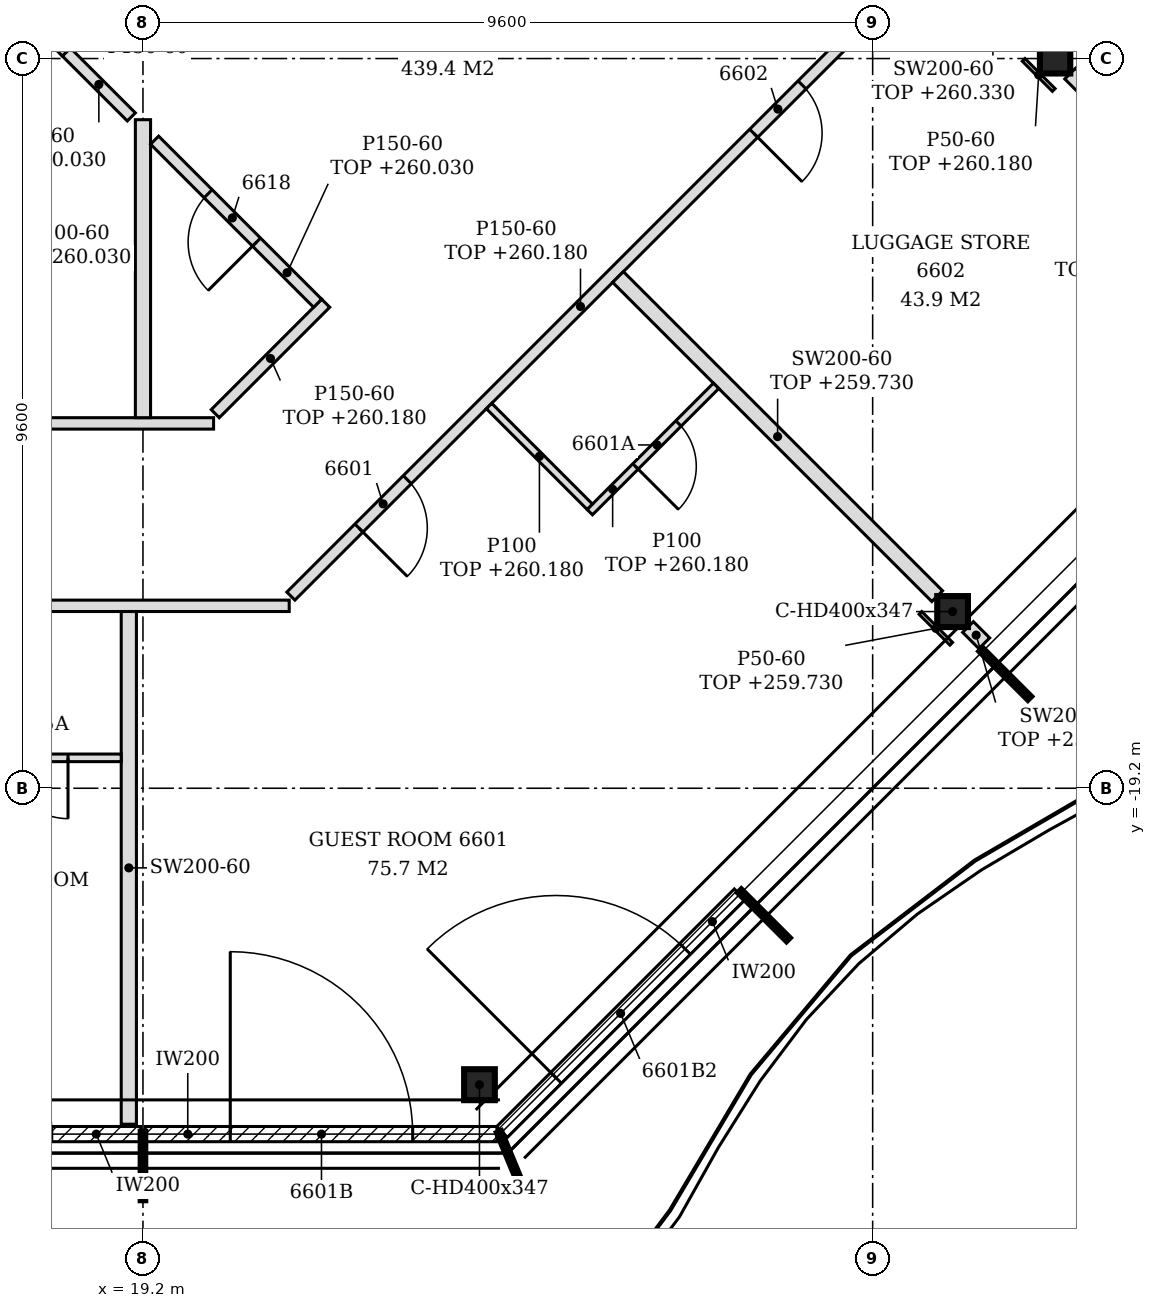
"""IFC4 building model, lengths in metres.
Left out: names, types, materials, properties, quantities, classifications, styles, units other than length and angle.
Written with IfcOpenShell. Run it as: python <this file> out.ifc"""

import sys

from ifc_helpers import new_model, si_unit, direction, frame, frame_2d, origin, origin_2d, place, context, subcontext, project, spatial, polyline, rectangle, i_section, outline, extrude, clip, halfspace, element, fill, save


model = new_model("IFC4")
c1 = context("Model", 3, precision=1e-05, world=origin(), true_north=direction((0.0, 1.0)))
c2 = subcontext(c1, "Body", "Model", "MODEL_VIEW")
j1 = project(units=[si_unit("LENGTHUNIT", "METRE"), si_unit("PLANEANGLEUNIT", "RADIAN")], contexts=[c1])
p1 = place(None, origin())
s1 = spatial("IfcSite", under=j1, at=p1, CompositionType="ELEMENT")
p2 = place(p1, origin())
s2 = spatial("IfcBuilding", under=s1, at=p2, CompositionType="ELEMENT")
p3 = place(p2, frame((0.0, 0.0, 257.4)))
s3 = spatial("IfcBuildingStorey", under=s2, at=p3, CompositionType="ELEMENT", Elevation=257.4)
for number, where, z_axis, x_axis in (
    (1, (23.627, -23.1, -0.15), (0.0, 0.0, 1.0), (1.0, 0.0, 0.0)),
    (2, (29.852, -16.876, -0.15), (0.0, 0.0, 1.0), (1.0, 0.0, 0.0)),
):
    element("IfcColumn", number, at=place(p3, frame(where, z_axis=z_axis, x_axis=x_axis)), inside=s3, PredefinedType="COLUMN", context=c2, shape_type="Clipping", body=[
        clip(extrude(i_section(OverallWidth=0.404, OverallDepth=0.407, WebThickness=0.027, FlangeThickness=0.044, FilletRadius=0.015, at=origin_2d()), origin(), (0.0, 0.0, 1.0), 3.5), halfspace(frame((0.0, 0.0, 3.05), z_axis=(0.0, 0.0, 1.0), x_axis=(1.0, 0.0, 0.0)), False)),
    ])
p4 = place(p3, frame((31.2, -9.6, -0.15), z_axis=(0.0, 0.0, 1.0), x_axis=(1.0, 0.0, 0.0)))
e3 = element("IfcColumn", 3, at=p4, inside=s3, PredefinedType="COLUMN", context=c2, shape_type="SweptSolid", body=[
    extrude(i_section(OverallWidth=0.399, OverallDepth=0.393, WebThickness=0.023, FlangeThickness=0.037, FilletRadius=0.015, at=origin_2d()), origin(), (0.0, 0.0, 1.0), 3.5),
])
p5 = place(p3, frame((14.43, -23.75, 0.0), z_axis=(0.0, 0.0, 1.0), x_axis=(1.0, 0.0, 0.0)))
e4 = element("IfcWall", 4, at=p5, inside=s3, PredefinedType="NOTDEFINED", context=c2, shape_type="SweptSolid", body=[
    extrude(rectangle(XDim=4.74, YDim=0.2, at=frame_2d((2.37, 0.0))), origin(), (0.0, 0.0, 1.0), 3.35),
])
p6 = place(p5, frame((1.17, 0.0, 0.0)))
e5 = element("IfcOpeningElement", 5, at=p6, cuts=e4, PredefinedType="OPENING", context=c2, shape_type="SweptSolid", body=[
    extrude(rectangle(XDim=2.4, YDim=2.4, at=frame_2d((1.2, 1.2))), frame((0.0, 0.11, 0.0), z_axis=(0.0, -1.0, 0.0), x_axis=(1.0, 0.0, 0.0)), (0.0, 0.0, 1.0), 0.22),
])
p7 = place(p3, frame((19.23, -23.75, 0.0), z_axis=(0.0, 0.0, 1.0), x_axis=(1.0, 0.0, 0.0)))
e6 = element("IfcWall", 6, at=p7, inside=s3, PredefinedType="NOTDEFINED", context=c2, shape_type="SweptSolid", body=[
    extrude(rectangle(XDim=4.626, YDim=0.2, at=frame_2d((2.313, 0.0))), origin(), (0.0, 0.0, 1.0), 3.35),
])
p8 = place(p7, frame((1.119, 0.0, 0.0)))
e7 = element("IfcOpeningElement", 7, at=p8, cuts=e6, PredefinedType="OPENING", context=c2, shape_type="SweptSolid", body=[
    extrude(rectangle(XDim=2.4, YDim=2.4, at=frame_2d((1.2, 1.2))), frame((0.0, 0.11, 0.0), z_axis=(0.0, -1.0, 0.0), x_axis=(1.0, 0.0, 0.0)), (0.0, 0.0, 1.0), 0.22),
])
p9 = place(p3, frame((23.925, -23.722, 0.0), z_axis=(0.0, 0.0, 1.0), x_axis=(0.707106781187, 0.707106781187, 0.0)))
e8 = element("IfcWall", 8, at=p9, inside=s3, PredefinedType="NOTDEFINED", context=c2, shape_type="SweptSolid", body=[
    extrude(rectangle(XDim=4.421, YDim=0.2, at=frame_2d((2.21, 0.0))), origin(), (0.0, 0.0, 1.0), 3.35),
])
p10 = place(p9, frame((1.005, 0.0, 0.0)))
e9 = element("IfcOpeningElement", 9, at=p10, cuts=e8, PredefinedType="OPENING", context=c2, shape_type="SweptSolid", body=[
    extrude(rectangle(XDim=2.4, YDim=2.4, at=frame_2d((1.2, 1.2))), frame((0.0, 0.11, 0.0), z_axis=(0.0, -1.0, 0.0), x_axis=(1.0, 0.0, 0.0)), (0.0, 0.0, 1.0), 0.22),
])
p11 = place(p3, frame((19.014, -23.62, 0.0), z_axis=(0.0, 0.0, 1.0), x_axis=(0.0, 1.0, 0.0)))
e10 = element("IfcWall", 10, at=p11, inside=s3, PredefinedType="PARTITIONING", context=c2, shape_type="SweptSolid", body=[
    extrude(outline(polyline([(0.0, 0.0), (6.745, 0.0), (6.745, 2.63), (1.02, 2.63), (1.018, 2.33), (0.02, 2.33), (0.018, 3.35), (0.0, 3.35), (0.0, 0.0)])), frame((0.0, 0.1, 0.0), z_axis=(0.0, -1.0, 0.0), x_axis=(1.0, 0.0, 0.0)), (0.0, 0.0, 1.0), 0.2),
])
p12 = place(p3, frame((16.564, -18.8, 0.0), z_axis=(0.0, 0.0, 1.0), x_axis=(1.0, 0.0, 0.0)))
e11 = element("IfcWall", 11, at=p12, inside=s3, PredefinedType="PARTITIONING", context=c2, shape_type="SweptSolid", body=[
    extrude(rectangle(XDim=2.35, YDim=0.1, at=frame_2d((1.175, 0.0))), origin(), (0.0, 0.0, 1.0), 3.35),
])
p13 = place(p12, frame((0.85, 0.0, 0.0)))
e12 = element("IfcOpeningElement", 12, at=p13, cuts=e11, PredefinedType="OPENING", context=c2, shape_type="SweptSolid", body=[
    extrude(rectangle(XDim=0.8, YDim=2.1, at=frame_2d((0.4, 1.05))), frame((0.0, 0.06, 0.0), z_axis=(0.0, -1.0, 0.0), x_axis=(1.0, 0.0, 0.0)), (0.0, 0.0, 1.0), 0.12),
])
p14 = place(p3, frame((30.269, -17.293, 0.0), z_axis=(0.0, 0.0, 1.0), x_axis=(-0.707509117806, 0.706704215511, 0.0)))
e13 = element("IfcWall", 13, at=p14, inside=s3, PredefinedType="PARTITIONING", context=c2, shape_type="SweptSolid", body=[
    extrude(rectangle(XDim=0.303, YDim=0.2, at=frame_2d((0.152, 0.0))), origin(), (0.0, 0.0, 1.0), 2.33),
])
p15 = place(p3, frame((-0.85, -16.8, 0.0), z_axis=(0.0, 0.0, 1.0), x_axis=(1.0, 0.0, 0.0)))
e14 = element("IfcWall", 14, at=p15, inside=s3, PredefinedType="PARTITIONING", context=c2, shape_type="SweptSolid", body=[
    extrude(outline(polyline([(0.0, 0.0), (21.974, 0.0), (21.974, 3.35), (20.199, 3.35), (20.198, 2.63), (19.899, 2.63), (19.897, 3.35), (8.199, 3.35), (8.198, 2.63), (7.899, 2.63), (7.897, 3.35), (0.712, 3.35), (0.71, 2.674), (0.504, 2.674), (0.502, 2.33), (0.0, 2.33), (0.0, 0.0)])), frame((0.0, 0.075, 0.0), z_axis=(0.0, -1.0, 0.0), x_axis=(1.0, 0.0, 0.0)), (0.0, 0.0, 1.0), 0.15),
])
p16 = place(p15, frame((2.893, 0.0, 0.0)))
e15 = element("IfcOpeningElement", 15, at=p16, cuts=e14, PredefinedType="OPENING", context=c2, shape_type="SweptSolid", body=[
    extrude(rectangle(XDim=0.9, YDim=2.1, at=frame_2d((0.45, 1.05))), frame((0.0, 0.085, 0.0), z_axis=(0.0, -1.0, 0.0), x_axis=(1.0, 0.0, 0.0)), (0.0, 0.0, 1.0), 0.17),
])
p17 = place(p15, frame((12.492, 0.0, 0.0)))
e16 = element("IfcOpeningElement", 16, at=p17, cuts=e14, PredefinedType="OPENING", context=c2, shape_type="SweptSolid", body=[
    extrude(rectangle(XDim=0.9, YDim=2.1, at=frame_2d((0.45, 1.05))), frame((0.0, 0.085, 0.0), z_axis=(0.0, -1.0, 0.0), x_axis=(1.0, 0.0, 0.0)), (0.0, 0.0, 1.0), 0.17),
])
p18 = place(p3, frame((21.146, -16.672, 0.0), z_axis=(0.0, 0.0, 1.0), x_axis=(0.707106781187, 0.707106781187, 0.0)))
e17 = element("IfcWall", 17, at=p18, inside=s3, PredefinedType="PARTITIONING", context=c2, shape_type="SweptSolid", body=[
    extrude(rectangle(XDim=17.719, YDim=0.15, at=frame_2d((8.859, 0.0))), origin(), (0.0, 0.0, 1.0), 2.78),
])
p19 = place(p18, frame((1.266, 0.0, 0.0)))
e18 = element("IfcOpeningElement", 18, at=p19, cuts=e17, PredefinedType="OPENING", context=c2, shape_type="SweptSolid", body=[
    extrude(rectangle(XDim=0.9, YDim=2.1, at=frame_2d((0.45, 1.05))), frame((0.0, 0.085, 0.0), z_axis=(0.0, -1.0, 0.0), x_axis=(1.0, 0.0, 0.0)), (0.0, 0.0, 1.0), 0.17),
])
p20 = place(p18, frame((8.611, 0.0, 0.0)))
e19 = element("IfcOpeningElement", 19, at=p20, cuts=e17, PredefinedType="OPENING", context=c2, shape_type="SweptSolid", body=[
    extrude(rectangle(XDim=0.9, YDim=2.1, at=frame_2d((0.45, 1.05))), frame((0.0, 0.085, 0.0), z_axis=(0.0, -1.0, 0.0), x_axis=(1.0, 0.0, 0.0)), (0.0, 0.0, 1.0), 0.17),
])
p21 = place(p18, frame((13.012, 0.0, 0.0)))
e20 = element("IfcOpeningElement", 20, at=p21, cuts=e17, PredefinedType="OPENING", context=c2, shape_type="SweptSolid", body=[
    extrude(rectangle(XDim=0.9, YDim=2.1, at=frame_2d((0.45, 1.05))), frame((0.0, 0.085, 0.0), z_axis=(0.0, -1.0, 0.0), x_axis=(1.0, 0.0, 0.0)), (0.0, 0.0, 1.0), 0.17),
])
p22 = place(p3, frame((29.649, -16.673, 0.0), z_axis=(0.0, 0.0, 1.0), x_axis=(-0.70712733811, 0.707086223665, 0.0)))
e21 = element("IfcWall", 21, at=p22, inside=s3, PredefinedType="PARTITIONING", context=c2, shape_type="SweptSolid", body=[
    extrude(rectangle(XDim=5.938, YDim=0.2, at=frame_2d((2.969, 0.0))), origin(), (0.0, 0.0, 1.0), 2.33),
])
p23 = place(p3, frame((25.079, -15.567, 0.0), z_axis=(0.0, 0.0, 1.0), x_axis=(0.707106781187, 0.707106781187, 0.0)))
e22 = element("IfcWall", 22, at=p23, inside=s3, PredefinedType="PARTITIONING", context=c2, shape_type="SweptSolid", body=[
    extrude(rectangle(XDim=2.35, YDim=0.1, at=frame_2d((1.175, 0.0))), origin(), (0.0, 0.0, 1.0), 2.78),
])
p24 = place(p23, frame((0.85, 0.0, 0.0)))
e23 = element("IfcOpeningElement", 23, at=p24, cuts=e22, PredefinedType="OPENING", context=c2, shape_type="SweptSolid", body=[
    extrude(rectangle(XDim=0.8, YDim=2.1, at=frame_2d((0.4, 1.05))), frame((0.0, 0.06, 0.0), z_axis=(0.0, -1.0, 0.0), x_axis=(1.0, 0.0, 0.0)), (0.0, 0.0, 1.0), 0.12),
])
p25 = place(p3, frame((25.079, -15.497, 0.0), z_axis=(0.0, 0.0, 1.0), x_axis=(-0.707106781187, 0.707106781187, 0.0)))
e24 = element("IfcWall", 24, at=p25, inside=s3, PredefinedType="PARTITIONING", context=c2, shape_type="SweptSolid", body=[
    extrude(rectangle(XDim=1.875, YDim=0.1, at=frame_2d((0.938, 0.0))), origin(), (0.0, 0.0, 1.0), 2.78),
])
p26 = place(p3, frame((7.125, -14.4, 0.0), z_axis=(0.0, 0.0, 1.0), x_axis=(1.0, 0.0, 0.0)))
e25 = element("IfcWall", 25, at=p26, inside=s3, PredefinedType="PARTITIONING", context=c2, shape_type="SweptSolid", body=[
    extrude(outline(polyline([(0.0, 0.0), (13.004, 0.0), (13.004, 2.78), (12.225, 2.78), (12.223, 2.63), (11.925, 2.63), (11.923, 2.78), (0.225, 2.78), (0.223, 2.63), (0.0, 2.63), (0.0, 0.0)])), frame((0.0, 0.075, 0.0), z_axis=(0.0, -1.0, 0.0), x_axis=(1.0, 0.0, 0.0)), (0.0, 0.0, 1.0), 0.15),
])
p27 = place(p3, frame((19.2, -14.325, 0.0), z_axis=(0.0, 0.0, 1.0), x_axis=(0.0, 1.0, 0.0)))
e26 = element("IfcWall", 26, at=p27, inside=s3, PredefinedType="PARTITIONING", context=c2, shape_type="SweptSolid", body=[
    extrude(rectangle(XDim=3.92, YDim=0.2, at=frame_2d((1.96, 0.0))), origin(), (0.0, 0.0, 1.0), 2.63),
])
p28 = place(p3, frame((20.151, -14.272, 0.0), z_axis=(0.0, 0.0, 1.0), x_axis=(0.707106781187, 0.707106781187, 0.0)))
e27 = element("IfcWall", 27, at=p28, inside=s3, PredefinedType="PARTITIONING", context=c2, shape_type="SweptSolid", body=[
    extrude(rectangle(XDim=2.055, YDim=0.15, at=frame_2d((1.027, 0.0))), origin(), (0.0, 0.0, 1.0), 2.78),
])
p29 = place(p3, frame((34.581, -12.981, 0.0), z_axis=(0.0, 0.0, 1.0), x_axis=(-0.707133900936, 0.707079660397, 0.0)))
e28 = element("IfcWall", 28, at=p29, inside=s3, PredefinedType="PARTITIONING", context=c2, shape_type="SweptSolid", body=[
    extrude(rectangle(XDim=4.501, YDim=0.2, at=frame_2d((2.25, 0.0))), origin(), (0.0, 0.0, 1.0), 2.33),
])
p30 = place(p3, frame((21.498, -12.819, 0.0), z_axis=(0.0, 0.0, 1.0), x_axis=(-0.707106781187, 0.707106781187, 0.0)))
e29 = element("IfcWall", 29, at=p30, inside=s3, PredefinedType="PARTITIONING", context=c2, shape_type="SweptSolid", body=[
    extrude(rectangle(XDim=3.033, YDim=0.15, at=frame_2d((1.517, 0.0))), origin(), (0.0, 0.0, 1.0), 2.63),
])
p31 = place(p30, frame((1.137, 0.0, 0.0)))
e30 = element("IfcOpeningElement", 30, at=p31, cuts=e29, PredefinedType="OPENING", context=c2, shape_type="SweptSolid", body=[
    extrude(rectangle(XDim=0.9, YDim=2.1, at=frame_2d((0.45, 1.05))), frame((0.0, 0.085, 0.0), z_axis=(0.0, -1.0, 0.0), x_axis=(1.0, 0.0, 0.0)), (0.0, 0.0, 1.0), 0.17),
])
p32 = place(p3, frame((19.047, -10.368, 0.0), z_axis=(0.0, 0.0, 1.0), x_axis=(-0.707409718716, 0.706803713817, 0.0)))
e31 = element("IfcWall", 31, at=p32, inside=s3, PredefinedType="PARTITIONING", context=c2, shape_type="SweptSolid", body=[
    extrude(rectangle(XDim=1.208, YDim=0.15, at=frame_2d((0.604, 0.0))), origin(), (0.0, 0.0, 1.0), 2.63),
])
p33 = place(p3, frame((18.086, -9.514, 0.0), z_axis=(0.0, 0.0, 1.0), x_axis=(0.707200419109, 0.707013130862, 0.0)))
e32 = element("IfcWall", 32, at=p33, inside=s3, PredefinedType="PARTITIONING", context=c2, shape_type="SweptSolid", body=[
    extrude(rectangle(XDim=1.303, YDim=0.15, at=frame_2d((0.652, 0.0))), origin(), (0.0, 0.0, 1.0), 3.35),
])
p34 = place(p3, frame((29.834, -17.299, 0.0), z_axis=(0.0, 0.0, 1.0), x_axis=(-0.707106781187, 0.707106781187, 0.0)))
e33 = element("IfcWall", 33, at=p34, inside=s3, PredefinedType="PARTITIONING", context=c2, shape_type="SweptSolid", body=[
    extrude(rectangle(XDim=0.573, YDim=0.05, at=frame_2d((0.287, 0.0))), origin(), (0.0, 0.0, 1.0), 2.33),
])
p35 = place(p3, frame((31.182, -10.014, 0.0), z_axis=(0.0, 0.0, 1.0), x_axis=(-0.707106781187, 0.707106781187, 0.0)))
e34 = element("IfcWall", 34, at=p35, inside=s3, PredefinedType="PARTITIONING", context=c2, shape_type="SweptSolid", body=[
    extrude(rectangle(XDim=0.56, YDim=0.05, at=frame_2d((0.28, 0.0))), origin(), (0.0, 0.0, 1.0), 2.78),
])
p36 = place(p8, origin())
e35 = element("IfcDoor", 35, at=p36, inside=s3, OperationType="SINGLE_SWING_LEFT", PredefinedType="DOOR", context=c2, shape_type="SweptSolid", body=[
    extrude(rectangle(XDim=2.4, YDim=2.4, at=frame_2d((1.2, 1.2))), frame((0.0, 0.025, 0.0), z_axis=(0.0, -1.0, 0.0), x_axis=(1.0, 0.0, 0.0)), (0.0, 0.0, 1.0), 0.05),
])
fill(e7, e35)
p37 = place(p10, origin())
e36 = element("IfcDoor", 36, at=p37, inside=s3, OperationType="SINGLE_SWING_LEFT", PredefinedType="DOOR", context=c2, shape_type="SweptSolid", body=[
    extrude(rectangle(XDim=2.4, YDim=2.4, at=frame_2d((1.2, 1.2))), frame((0.0, 0.025, 0.0), z_axis=(0.0, -1.0, 0.0), x_axis=(1.0, 0.0, 0.0)), (0.0, 0.0, 1.0), 0.05),
])
fill(e9, e36)
p38 = place(p19, frame((0.9, 0.0, 0.0), z_axis=(0.0, 0.0, 1.0), x_axis=(-1.0, 0.0, 0.0)))
e37 = element("IfcDoor", 37, at=p38, inside=s3, OperationType="SINGLE_SWING_RIGHT", PredefinedType="DOOR", context=c2, shape_type="SweptSolid", body=[
    extrude(rectangle(XDim=0.9, YDim=2.1, at=frame_2d((0.45, 1.05))), frame((0.0, 0.025, 0.0), z_axis=(0.0, -1.0, 0.0), x_axis=(1.0, 0.0, 0.0)), (0.0, 0.0, 1.0), 0.05),
])
fill(e18, e37)
p39 = place(p24, frame((0.8, 0.0, 0.0), z_axis=(0.0, 0.0, 1.0), x_axis=(-1.0, 0.0, 0.0)))
e38 = element("IfcDoor", 38, at=p39, inside=s3, OperationType="SINGLE_SWING_RIGHT", PredefinedType="DOOR", context=c2, shape_type="SweptSolid", body=[
    extrude(rectangle(XDim=0.8, YDim=2.1, at=frame_2d((0.4, 1.05))), frame((0.0, 0.025, 0.0), z_axis=(0.0, -1.0, 0.0), x_axis=(1.0, 0.0, 0.0)), (0.0, 0.0, 1.0), 0.05),
])
fill(e23, e38)
p40 = place(p20, frame((0.9, 0.0, 0.0), z_axis=(0.0, 0.0, 1.0), x_axis=(-1.0, 0.0, 0.0)))
e39 = element("IfcDoor", 39, at=p40, inside=s3, OperationType="SINGLE_SWING_RIGHT", PredefinedType="DOOR", context=c2, shape_type="SweptSolid", body=[
    extrude(rectangle(XDim=0.9, YDim=2.1, at=frame_2d((0.45, 1.05))), frame((0.0, 0.025, 0.0), z_axis=(0.0, -1.0, 0.0), x_axis=(1.0, 0.0, 0.0)), (0.0, 0.0, 1.0), 0.05),
])
fill(e19, e39)
p41 = place(p13, frame((0.8, 0.0, 0.0), z_axis=(0.0, 0.0, 1.0), x_axis=(-1.0, 0.0, 0.0)))
e40 = element("IfcDoor", 40, at=p41, inside=s3, OperationType="SINGLE_SWING_LEFT", PredefinedType="DOOR", context=c2, shape_type="SweptSolid", body=[
    extrude(rectangle(XDim=0.8, YDim=2.1, at=frame_2d((0.4, 1.05))), frame((0.0, 0.025, 0.0), z_axis=(0.0, -1.0, 0.0), x_axis=(1.0, 0.0, 0.0)), (0.0, 0.0, 1.0), 0.05),
])
fill(e12, e40)
p42 = place(p31, origin())
e41 = element("IfcDoor", 41, at=p42, inside=s3, OperationType="SINGLE_SWING_LEFT", PredefinedType="DOOR", context=c2, shape_type="SweptSolid", body=[
    extrude(rectangle(XDim=0.9, YDim=2.1, at=frame_2d((0.45, 1.05))), frame((0.0, 0.025, 0.0), z_axis=(0.0, -1.0, 0.0), x_axis=(1.0, 0.0, 0.0)), (0.0, 0.0, 1.0), 0.05),
])
fill(e30, e41)
save(model, sys.argv[1])
